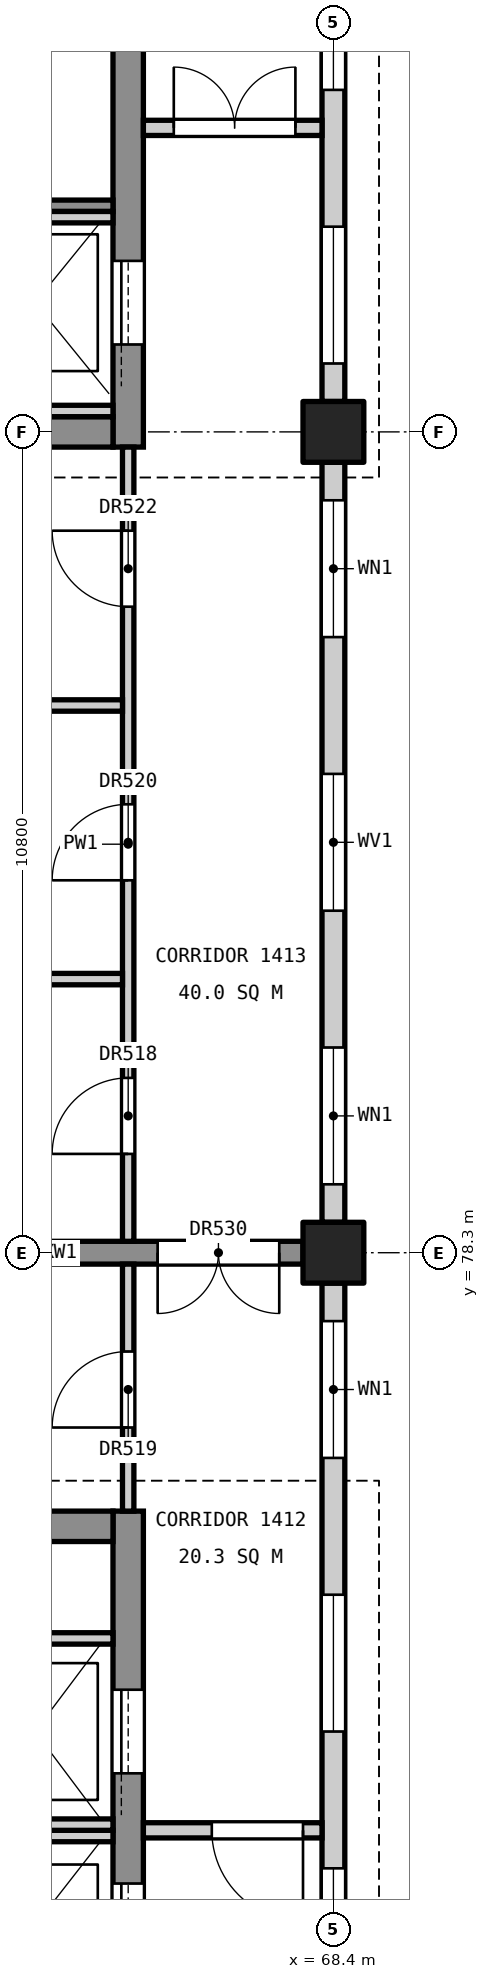
"""IFC4 building model, lengths in metres.
Left out: names, types, materials, properties, quantities, classifications, styles, units other than length and angle.
Written with IfcOpenShell. Run it as: python <this file> out.ifc"""

import sys

from ifc_helpers import new_model, si_unit, direction, frame, frame_2d, origin, origin_2d, place, context, subcontext, project, spatial, rectangle, extrude, element, fill, save


model = new_model("IFC4")
c1 = context("Model", 3, precision=1e-05, world=origin(), true_north=direction((0.0, 1.0)))
c2 = subcontext(c1, "Body", "Model", "MODEL_VIEW")
j1 = project(units=[si_unit("LENGTHUNIT", "METRE"), si_unit("PLANEANGLEUNIT", "RADIAN")], contexts=[c1])
p1 = place(None, origin())
s1 = spatial("IfcSite", under=j1, at=p1, CompositionType="ELEMENT")
p2 = place(p1, origin())
s2 = spatial("IfcBuilding", under=s1, at=p2, CompositionType="ELEMENT")
p3 = place(p2, frame((0.0, 0.0, 70.2)))
s3 = spatial("IfcBuildingStorey", under=s2, at=p3, CompositionType="ELEMENT", Elevation=70.2)
for number, where, z_axis, x_axis in (
    (1, (68.4, 78.3, 0.0), (0.0, 0.0, 1.0), (1.0, 0.0, 0.0)),
    (2, (68.4, 89.1, 0.0), (0.0, 0.0, 1.0), (1.0, 0.0, 0.0)),
):
    element("IfcColumn", number, at=place(p3, frame(where, z_axis=z_axis, x_axis=x_axis)), inside=s3, PredefinedType="COLUMN", context=c2, shape_type="SweptSolid", body=[
        extrude(rectangle(XDim=0.8, YDim=0.8, at=origin_2d()), origin(), (0.0, 0.0, 1.0), 4.8),
    ])
p4 = place(p3, frame((65.7, 60.1, 0.0), z_axis=(0.0, 0.0, 1.0), x_axis=(0.0, 1.0, 0.0)))
e3 = element("IfcWall", 3, at=p4, inside=s3, PredefinedType="SHEAR", context=c2, shape_type="SweptSolid", body=[
    extrude(rectangle(XDim=14.8, YDim=0.4, at=frame_2d((7.4, 0.0))), origin(), (0.0, 0.0, 1.0), 4.55),
])
p5 = place(p4, frame((0.5, 0.0, 0.0)))
e4 = element("IfcOpeningElement", 4, at=p5, cuts=e3, PredefinedType="OPENING", context=c2, shape_type="SweptSolid", body=[
    extrude(rectangle(XDim=1.4, YDim=2.1, at=frame_2d((0.7, 1.05))), frame((0.0, 0.21, 0.0), z_axis=(0.0, -1.0, 0.0), x_axis=(1.0, 0.0, 0.0)), (0.0, 0.0, 1.0), 0.42),
])
p6 = place(p4, frame((8.8, 0.0, 0.0)))
e5 = element("IfcOpeningElement", 5, at=p6, cuts=e3, PredefinedType="OPENING", context=c2, shape_type="SweptSolid", body=[
    extrude(rectangle(XDim=1.1, YDim=2.1, at=frame_2d((0.55, 1.05))), frame((0.0, 0.21, 0.0), z_axis=(0.0, -1.0, 0.0), x_axis=(1.0, 0.0, 0.0)), (0.0, 0.0, 1.0), 0.42),
])
p7 = place(p4, frame((11.35, 0.0, 0.0)))
e6 = element("IfcOpeningElement", 6, at=p7, cuts=e3, PredefinedType="OPENING", context=c2, shape_type="SweptSolid", body=[
    extrude(rectangle(XDim=1.1, YDim=2.1, at=frame_2d((0.55, 1.05))), frame((0.0, 0.21, 0.0), z_axis=(0.0, -1.0, 0.0), x_axis=(1.0, 0.0, 0.0)), (0.0, 0.0, 1.0), 0.42),
])
p8 = place(p3, frame((61.4, 74.7, 0.0), z_axis=(0.0, 0.0, 1.0), x_axis=(1.0, 0.0, 0.0)))
e7 = element("IfcWall", 7, at=p8, inside=s3, PredefinedType="SHEAR", context=c2, shape_type="SweptSolid", body=[
    extrude(rectangle(XDim=4.1, YDim=0.4, at=frame_2d((2.05, 0.0))), origin(), (0.0, 0.0, 1.0), 4.55),
])
p9 = place(p3, frame((65.7, 88.9, 0.0), z_axis=(0.0, 0.0, 1.0), x_axis=(0.0, 1.0, 0.0)))
e8 = element("IfcWall", 8, at=p9, inside=s3, PredefinedType="SHEAR", context=c2, shape_type="SweptSolid", body=[
    extrude(rectangle(XDim=11.2, YDim=0.4, at=frame_2d((5.6, 0.0))), origin(), (0.0, 0.0, 1.0), 4.55),
])
p10 = place(p9, frame((9.3, 0.0, 0.0)))
e9 = element("IfcOpeningElement", 9, at=p10, cuts=e8, PredefinedType="OPENING", context=c2, shape_type="SweptSolid", body=[
    extrude(rectangle(XDim=1.4, YDim=2.1, at=frame_2d((0.7, 1.05))), frame((0.0, 0.21, 0.0), z_axis=(0.0, -1.0, 0.0), x_axis=(1.0, 0.0, 0.0)), (0.0, 0.0, 1.0), 0.42),
])
p11 = place(p9, frame((1.35, 0.0, 0.0)))
e10 = element("IfcOpeningElement", 10, at=p11, cuts=e8, PredefinedType="OPENING", context=c2, shape_type="SweptSolid", body=[
    extrude(rectangle(XDim=1.1, YDim=2.1, at=frame_2d((0.55, 1.05))), frame((0.0, 0.21, 0.0), z_axis=(0.0, -1.0, 0.0), x_axis=(1.0, 0.0, 0.0)), (0.0, 0.0, 1.0), 0.42),
])
p12 = place(p3, frame((61.4, 89.1, 0.0), z_axis=(0.0, 0.0, 1.0), x_axis=(1.0, 0.0, 0.0)))
e11 = element("IfcWall", 11, at=p12, inside=s3, PredefinedType="SHEAR", context=c2, shape_type="SweptSolid", body=[
    extrude(rectangle(XDim=4.1, YDim=0.4, at=frame_2d((2.05, 0.0))), origin(), (0.0, 0.0, 1.0), 4.55),
])
p13 = place(p3, frame((61.6, 78.3, 0.0), z_axis=(0.0, 0.0, 1.0), x_axis=(1.0, 0.0, 0.0)))
e12 = element("IfcWall", 12, at=p13, inside=s3, PredefinedType="SHEAR", context=c2, shape_type="SweptSolid", body=[
    extrude(rectangle(XDim=6.4, YDim=0.3, at=frame_2d((3.2, 0.0))), origin(), (0.0, 0.0, 1.0), 4.55),
])
p14 = place(p13, frame((4.488, 0.0, 0.0)))
e13 = element("IfcOpeningElement", 13, at=p14, cuts=e12, PredefinedType="OPENING", context=c2, shape_type="SweptSolid", body=[
    extrude(rectangle(XDim=1.6, YDim=2.1, at=frame_2d((0.8, 1.05))), frame((0.0, 0.16, 0.0), z_axis=(0.0, -1.0, 0.0), x_axis=(1.0, 0.0, 0.0)), (0.0, 0.0, 1.0), 0.32),
])
p15 = place(p3, frame((61.4, 92.075, 0.0), z_axis=(0.0, 0.0, 1.0), x_axis=(1.0, 0.0, 0.0)))
e14 = element("IfcWall", 14, at=p15, inside=s3, PredefinedType="SOLIDWALL", context=c2, shape_type="SweptSolid", body=[
    extrude(rectangle(XDim=4.1, YDim=0.15, at=frame_2d((2.05, 0.0))), origin(), (0.0, 0.0, 1.0), 4.55),
])
p16 = place(p3, frame((63.65, 70.625, 0.0), z_axis=(0.0, 0.0, 1.0), x_axis=(1.0, 0.0, 0.0)))
e15 = element("IfcWall", 15, at=p16, inside=s3, PredefinedType="SOLIDWALL", context=c2, shape_type="SweptSolid", body=[
    extrude(rectangle(XDim=1.85, YDim=0.15, at=frame_2d((0.925, 0.0))), origin(), (0.0, 0.0, 1.0), 4.8),
])
for number, where, z_axis, x_axis in (
    (16, (63.65, 70.775, 0.0), (0.0, 0.0, 1.0), (1.0, 0.0, 0.0)),
    (17, (63.65, 73.225, 0.0), (0.0, 0.0, 1.0), (1.0, 0.0, 0.0)),
    (18, (63.65, 91.925, 0.0), (0.0, 0.0, 1.0), (1.0, 0.0, 0.0)),
    (19, (63.65, 89.375, 0.0), (0.0, 0.0, 1.0), (1.0, 0.0, 0.0)),
):
    element("IfcWall", number, at=place(p3, frame(where, z_axis=z_axis, x_axis=x_axis)), inside=s3, PredefinedType="SOLIDWALL", context=c2, shape_type="SweptSolid", body=[
        extrude(rectangle(XDim=1.85, YDim=0.15, at=frame_2d((0.925, 0.0))), origin(), (0.0, 0.0, 1.0), 4.55),
    ])
p17 = place(p3, frame((68.4, 67.9, 0.0), z_axis=(0.0, 0.0, 1.0), x_axis=(0.0, 1.0, 0.0)))
e20 = element("IfcWall", 20, at=p17, inside=s3, PredefinedType="STANDARD", context=c2, shape_type="SweptSolid", body=[
    extrude(rectangle(XDim=10.0, YDim=0.3, at=frame_2d((5.0, 0.0))), origin(), (0.0, 0.0, 1.0), 3.55),
])
p18 = place(p17, frame((0.5, 0.0, 0.9)))
e21 = element("IfcOpeningElement", 21, at=p18, cuts=e20, PredefinedType="OPENING", context=c2, shape_type="SweptSolid", body=[
    extrude(rectangle(XDim=1.8, YDim=2.4, at=frame_2d((0.9, 1.2))), frame((0.0, 0.16, 0.0), z_axis=(0.0, -1.0, 0.0), x_axis=(1.0, 0.0, 0.0)), (0.0, 0.0, 1.0), 0.32),
])
p19 = place(p17, frame((4.1, 0.0, 0.9)))
e22 = element("IfcOpeningElement", 22, at=p19, cuts=e20, PredefinedType="OPENING", context=c2, shape_type="SweptSolid", body=[
    extrude(rectangle(XDim=1.8, YDim=2.4, at=frame_2d((0.9, 1.2))), frame((0.0, 0.16, 0.0), z_axis=(0.0, -1.0, 0.0), x_axis=(1.0, 0.0, 0.0)), (0.0, 0.0, 1.0), 0.32),
])
p20 = place(p17, frame((7.7, 0.0, 0.9)))
e23 = element("IfcOpeningElement", 23, at=p20, cuts=e20, PredefinedType="OPENING", context=c2, shape_type="SweptSolid", body=[
    extrude(rectangle(XDim=1.8, YDim=2.4, at=frame_2d((0.9, 1.2))), frame((0.0, 0.16, 0.0), z_axis=(0.0, -1.0, 0.0), x_axis=(1.0, 0.0, 0.0)), (0.0, 0.0, 1.0), 0.32),
])
p21 = place(p3, frame((68.4, 78.7, 0.0), z_axis=(0.0, 0.0, 1.0), x_axis=(0.0, 1.0, 0.0)))
e24 = element("IfcWall", 24, at=p21, inside=s3, PredefinedType="STANDARD", context=c2, shape_type="SweptSolid", body=[
    extrude(rectangle(XDim=10.0, YDim=0.3, at=frame_2d((5.0, 0.0))), origin(), (0.0, 0.0, 1.0), 3.55),
])
p22 = place(p21, frame((0.5, 0.0, 0.9)))
e25 = element("IfcOpeningElement", 25, at=p22, cuts=e24, PredefinedType="OPENING", context=c2, shape_type="SweptSolid", body=[
    extrude(rectangle(XDim=1.8, YDim=2.4, at=frame_2d((0.9, 1.2))), frame((0.0, 0.16, 0.0), z_axis=(0.0, -1.0, 0.0), x_axis=(1.0, 0.0, 0.0)), (0.0, 0.0, 1.0), 0.32),
])
p23 = place(p21, frame((4.1, 0.0, 0.9)))
e26 = element("IfcOpeningElement", 26, at=p23, cuts=e24, PredefinedType="OPENING", context=c2, shape_type="SweptSolid", body=[
    extrude(rectangle(XDim=1.8, YDim=2.4, at=frame_2d((0.9, 1.2))), frame((0.0, 0.16, 0.0), z_axis=(0.0, -1.0, 0.0), x_axis=(1.0, 0.0, 0.0)), (0.0, 0.0, 1.0), 0.32),
])
p24 = place(p21, frame((7.7, 0.0, 0.9)))
e27 = element("IfcOpeningElement", 27, at=p24, cuts=e24, PredefinedType="OPENING", context=c2, shape_type="SweptSolid", body=[
    extrude(rectangle(XDim=1.8, YDim=2.4, at=frame_2d((0.9, 1.2))), frame((0.0, 0.16, 0.0), z_axis=(0.0, -1.0, 0.0), x_axis=(1.0, 0.0, 0.0)), (0.0, 0.0, 1.0), 0.32),
])
p25 = place(p3, frame((68.4, 89.5, 0.0), z_axis=(0.0, 0.0, 1.0), x_axis=(0.0, 1.0, 0.0)))
e28 = element("IfcWall", 28, at=p25, inside=s3, PredefinedType="STANDARD", context=c2, shape_type="SweptSolid", body=[
    extrude(rectangle(XDim=10.0, YDim=0.3, at=frame_2d((5.0, 0.0))), origin(), (0.0, 0.0, 1.0), 3.55),
])
p26 = place(p25, frame((0.5, 0.0, 0.9)))
e29 = element("IfcOpeningElement", 29, at=p26, cuts=e28, PredefinedType="OPENING", context=c2, shape_type="SweptSolid", body=[
    extrude(rectangle(XDim=1.8, YDim=2.4, at=frame_2d((0.9, 1.2))), frame((0.0, 0.16, 0.0), z_axis=(0.0, -1.0, 0.0), x_axis=(1.0, 0.0, 0.0)), (0.0, 0.0, 1.0), 0.32),
])
p27 = place(p25, frame((4.1, 0.0, 0.9)))
e30 = element("IfcOpeningElement", 30, at=p27, cuts=e28, PredefinedType="OPENING", context=c2, shape_type="SweptSolid", body=[
    extrude(rectangle(XDim=1.8, YDim=2.4, at=frame_2d((0.9, 1.2))), frame((0.0, 0.16, 0.0), z_axis=(0.0, -1.0, 0.0), x_axis=(1.0, 0.0, 0.0)), (0.0, 0.0, 1.0), 0.32),
])
p28 = place(p25, frame((7.7, 0.0, 0.9)))
e31 = element("IfcOpeningElement", 31, at=p28, cuts=e28, PredefinedType="OPENING", context=c2, shape_type="SweptSolid", body=[
    extrude(rectangle(XDim=1.8, YDim=2.4, at=frame_2d((0.9, 1.2))), frame((0.0, 0.16, 0.0), z_axis=(0.0, -1.0, 0.0), x_axis=(1.0, 0.0, 0.0)), (0.0, 0.0, 1.0), 0.32),
])
p29 = place(p3, frame((65.7, 74.9, 0.0), z_axis=(0.0, 0.0, 1.0), x_axis=(0.0, 1.0, 0.0)))
e32 = element("IfcWall", 32, at=p29, inside=s3, PredefinedType="PARTITIONING", context=c2, shape_type="SweptSolid", body=[
    extrude(rectangle(XDim=3.25, YDim=0.15, at=frame_2d((1.625, 0.0))), origin(), (0.0, 0.0, 1.0), 3.55),
])
p30 = place(p29, frame((1.1, 0.0, 0.0)))
e33 = element("IfcOpeningElement", 33, at=p30, cuts=e32, PredefinedType="OPENING", context=c2, shape_type="SweptSolid", body=[
    extrude(rectangle(XDim=1.0, YDim=2.1, at=frame_2d((0.5, 1.05))), frame((0.0, 0.085, 0.0), z_axis=(0.0, -1.0, 0.0), x_axis=(1.0, 0.0, 0.0)), (0.0, 0.0, 1.0), 0.17),
])
p31 = place(p3, frame((65.7, 78.45, 0.0), z_axis=(0.0, 0.0, 1.0), x_axis=(0.0, 1.0, 0.0)))
e34 = element("IfcWall", 34, at=p31, inside=s3, PredefinedType="PARTITIONING", context=c2, shape_type="SweptSolid", body=[
    extrude(rectangle(XDim=10.45, YDim=0.15, at=frame_2d((5.225, 0.0))), origin(), (0.0, 0.0, 1.0), 3.55),
])
p32 = place(p31, frame((1.15, 0.0, 0.0)))
e35 = element("IfcOpeningElement", 35, at=p32, cuts=e34, PredefinedType="OPENING", context=c2, shape_type="SweptSolid", body=[
    extrude(rectangle(XDim=1.0, YDim=2.1, at=frame_2d((0.5, 1.05))), frame((0.0, 0.085, 0.0), z_axis=(0.0, -1.0, 0.0), x_axis=(1.0, 0.0, 0.0)), (0.0, 0.0, 1.0), 0.17),
])
p33 = place(p31, frame((4.75, 0.0, 0.0)))
e36 = element("IfcOpeningElement", 36, at=p33, cuts=e34, PredefinedType="OPENING", context=c2, shape_type="SweptSolid", body=[
    extrude(rectangle(XDim=1.0, YDim=2.1, at=frame_2d((0.5, 1.05))), frame((0.0, 0.085, 0.0), z_axis=(0.0, -1.0, 0.0), x_axis=(1.0, 0.0, 0.0)), (0.0, 0.0, 1.0), 0.17),
])
p34 = place(p31, frame((8.35, 0.0, 0.0)))
e37 = element("IfcOpeningElement", 37, at=p34, cuts=e34, PredefinedType="OPENING", context=c2, shape_type="SweptSolid", body=[
    extrude(rectangle(XDim=1.0, YDim=2.1, at=frame_2d((0.5, 1.05))), frame((0.0, 0.085, 0.0), z_axis=(0.0, -1.0, 0.0), x_axis=(1.0, 0.0, 0.0)), (0.0, 0.0, 1.0), 0.17),
])
for number, where, z_axis, x_axis in (
    (38, (61.35, 81.9, 0.0), (0.0, 0.0, 1.0), (1.0, 0.0, 0.0)),
    (39, (61.35, 85.5, 0.0), (0.0, 0.0, 1.0), (1.0, 0.0, 0.0)),
):
    element("IfcWall", number, at=place(p3, frame(where, z_axis=z_axis, x_axis=x_axis)), inside=s3, PredefinedType="PARTITIONING", context=c2, shape_type="SweptSolid", body=[
        extrude(rectangle(XDim=4.275, YDim=0.15, at=frame_2d((2.137, 0.0))), origin(), (0.0, 0.0, 1.0), 3.85),
    ])
p35 = place(p3, frame((65.9, 93.1, 0.0), z_axis=(0.0, 0.0, 1.0), x_axis=(1.0, 0.0, 0.0)))
e40 = element("IfcWall", 40, at=p35, inside=s3, PredefinedType="PARTITIONING", context=c2, shape_type="SweptSolid", body=[
    extrude(rectangle(XDim=2.35, YDim=0.2, at=frame_2d((1.175, 0.0))), origin(), (0.0, 0.0, 1.0), 3.55),
])
p36 = place(p35, frame((0.4, 0.0, 0.0)))
e41 = element("IfcOpeningElement", 41, at=p36, cuts=e40, PredefinedType="OPENING", context=c2, shape_type="SweptSolid", body=[
    extrude(rectangle(XDim=1.6, YDim=2.1, at=frame_2d((0.8, 1.05))), frame((0.0, 0.11, 0.0), z_axis=(0.0, -1.0, 0.0), x_axis=(1.0, 0.0, 0.0)), (0.0, 0.0, 1.0), 0.22),
])
p37 = place(p3, frame((65.9, 70.7, 0.0), z_axis=(0.0, 0.0, 1.0), x_axis=(1.0, 0.0, 0.0)))
e42 = element("IfcWall", 42, at=p37, inside=s3, PredefinedType="PARTITIONING", context=c2, shape_type="SweptSolid", body=[
    extrude(rectangle(XDim=2.35, YDim=0.2, at=frame_2d((1.175, 0.0))), origin(), (0.0, 0.0, 1.0), 3.55),
])
p38 = place(p37, frame((0.9, 0.0, 0.0)))
e43 = element("IfcOpeningElement", 43, at=p38, cuts=e42, PredefinedType="OPENING", context=c2, shape_type="SweptSolid", body=[
    extrude(rectangle(XDim=1.2, YDim=2.1, at=frame_2d((0.6, 1.05))), frame((0.0, 0.11, 0.0), z_axis=(0.0, -1.0, 0.0), x_axis=(1.0, 0.0, 0.0)), (0.0, 0.0, 1.0), 0.22),
])
p39 = place(p6, origin())
e44 = element("IfcDoor", 44, at=p39, inside=s3, OperationType="SLIDING_TO_LEFT", PredefinedType="DOOR", context=c2, shape_type="SweptSolid", body=[
    extrude(rectangle(XDim=1.1, YDim=2.1, at=frame_2d((0.55, 1.05))), frame((0.0, 0.025, 0.0), z_axis=(0.0, -1.0, 0.0), x_axis=(1.0, 0.0, 0.0)), (0.0, 0.0, 1.0), 0.05),
])
fill(e5, e44)
p40 = place(p7, origin())
e45 = element("IfcDoor", 45, at=p40, inside=s3, OperationType="SLIDING_TO_LEFT", PredefinedType="DOOR", context=c2, shape_type="SweptSolid", body=[
    extrude(rectangle(XDim=1.1, YDim=2.1, at=frame_2d((0.55, 1.05))), frame((0.0, 0.025, 0.0), z_axis=(0.0, -1.0, 0.0), x_axis=(1.0, 0.0, 0.0)), (0.0, 0.0, 1.0), 0.05),
])
fill(e6, e45)
p41 = place(p11, origin())
e46 = element("IfcDoor", 46, at=p41, inside=s3, OperationType="SLIDING_TO_LEFT", PredefinedType="DOOR", context=c2, shape_type="SweptSolid", body=[
    extrude(rectangle(XDim=1.1, YDim=2.1, at=frame_2d((0.55, 1.05))), frame((0.0, 0.025, 0.0), z_axis=(0.0, -1.0, 0.0), x_axis=(1.0, 0.0, 0.0)), (0.0, 0.0, 1.0), 0.05),
])
fill(e10, e46)
p42 = place(p18, origin())
e47 = element("IfcWindow", 47, at=p42, inside=s3, PartitioningType="SINGLE_PANEL", PredefinedType="WINDOW", context=c2, shape_type="SweptSolid", body=[
    extrude(rectangle(XDim=1.8, YDim=2.4, at=frame_2d((0.9, 1.2))), frame((0.0, 0.03, 0.0), z_axis=(0.0, -1.0, 0.0), x_axis=(1.0, 0.0, 0.0)), (0.0, 0.0, 1.0), 0.06),
])
fill(e21, e47)
p43 = place(p19, origin())
e48 = element("IfcWindow", 48, at=p43, inside=s3, PartitioningType="SINGLE_PANEL", PredefinedType="WINDOW", context=c2, shape_type="SweptSolid", body=[
    extrude(rectangle(XDim=1.8, YDim=2.4, at=frame_2d((0.9, 1.2))), frame((0.0, 0.03, 0.0), z_axis=(0.0, -1.0, 0.0), x_axis=(1.0, 0.0, 0.0)), (0.0, 0.0, 1.0), 0.06),
])
fill(e22, e48)
p44 = place(p20, origin())
e49 = element("IfcWindow", 49, at=p44, inside=s3, PartitioningType="SINGLE_PANEL", PredefinedType="WINDOW", context=c2, shape_type="SweptSolid", body=[
    extrude(rectangle(XDim=1.8, YDim=2.4, at=frame_2d((0.9, 1.2))), frame((0.0, 0.03, 0.0), z_axis=(0.0, -1.0, 0.0), x_axis=(1.0, 0.0, 0.0)), (0.0, 0.0, 1.0), 0.06),
])
fill(e23, e49)
p45 = place(p22, origin())
e50 = element("IfcWindow", 50, at=p45, inside=s3, PartitioningType="SINGLE_PANEL", PredefinedType="WINDOW", context=c2, shape_type="SweptSolid", body=[
    extrude(rectangle(XDim=1.8, YDim=2.4, at=frame_2d((0.9, 1.2))), frame((0.0, 0.03, 0.0), z_axis=(0.0, -1.0, 0.0), x_axis=(1.0, 0.0, 0.0)), (0.0, 0.0, 1.0), 0.06),
])
fill(e25, e50)
p46 = place(p23, origin())
e51 = element("IfcWindow", 51, at=p46, inside=s3, PartitioningType="SINGLE_PANEL", PredefinedType="WINDOW", context=c2, shape_type="SweptSolid", body=[
    extrude(rectangle(XDim=1.8, YDim=2.4, at=frame_2d((0.9, 1.2))), frame((0.0, 0.03, 0.0), z_axis=(0.0, -1.0, 0.0), x_axis=(1.0, 0.0, 0.0)), (0.0, 0.0, 1.0), 0.06),
])
fill(e26, e51)
p47 = place(p24, origin())
e52 = element("IfcWindow", 52, at=p47, inside=s3, PartitioningType="SINGLE_PANEL", PredefinedType="WINDOW", context=c2, shape_type="SweptSolid", body=[
    extrude(rectangle(XDim=1.8, YDim=2.4, at=frame_2d((0.9, 1.2))), frame((0.0, 0.03, 0.0), z_axis=(0.0, -1.0, 0.0), x_axis=(1.0, 0.0, 0.0)), (0.0, 0.0, 1.0), 0.06),
])
fill(e27, e52)
p48 = place(p26, origin())
e53 = element("IfcWindow", 53, at=p48, inside=s3, PartitioningType="SINGLE_PANEL", PredefinedType="WINDOW", context=c2, shape_type="SweptSolid", body=[
    extrude(rectangle(XDim=1.8, YDim=2.4, at=frame_2d((0.9, 1.2))), frame((0.0, 0.03, 0.0), z_axis=(0.0, -1.0, 0.0), x_axis=(1.0, 0.0, 0.0)), (0.0, 0.0, 1.0), 0.06),
])
fill(e29, e53)
p49 = place(p27, origin())
e54 = element("IfcWindow", 54, at=p49, inside=s3, PartitioningType="SINGLE_PANEL", PredefinedType="WINDOW", context=c2, shape_type="SweptSolid", body=[
    extrude(rectangle(XDim=1.8, YDim=2.4, at=frame_2d((0.9, 1.2))), frame((0.0, 0.03, 0.0), z_axis=(0.0, -1.0, 0.0), x_axis=(1.0, 0.0, 0.0)), (0.0, 0.0, 1.0), 0.06),
])
fill(e30, e54)
p50 = place(p32, origin())
e55 = element("IfcDoor", 55, at=p50, inside=s3, OperationType="SINGLE_SWING_LEFT", PredefinedType="DOOR", context=c2, shape_type="SweptSolid", body=[
    extrude(rectangle(XDim=1.0, YDim=2.1, at=frame_2d((0.5, 1.05))), frame((0.0, 0.025, 0.0), z_axis=(0.0, -1.0, 0.0), x_axis=(1.0, 0.0, 0.0)), (0.0, 0.0, 1.0), 0.05),
])
fill(e35, e55)
p51 = place(p30, origin())
e56 = element("IfcDoor", 56, at=p51, inside=s3, OperationType="SINGLE_SWING_LEFT", PredefinedType="DOOR", context=c2, shape_type="SweptSolid", body=[
    extrude(rectangle(XDim=1.0, YDim=2.1, at=frame_2d((0.5, 1.05))), frame((0.0, 0.025, 0.0), z_axis=(0.0, -1.0, 0.0), x_axis=(1.0, 0.0, 0.0)), (0.0, 0.0, 1.0), 0.05),
])
fill(e33, e56)
p52 = place(p33, origin())
e57 = element("IfcDoor", 57, at=p52, inside=s3, OperationType="SINGLE_SWING_LEFT", PredefinedType="DOOR", context=c2, shape_type="SweptSolid", body=[
    extrude(rectangle(XDim=1.0, YDim=2.1, at=frame_2d((0.5, 1.05))), frame((0.0, 0.025, 0.0), z_axis=(0.0, -1.0, 0.0), x_axis=(1.0, 0.0, 0.0)), (0.0, 0.0, 1.0), 0.05),
])
fill(e36, e57)
p53 = place(p34, origin())
e58 = element("IfcDoor", 58, at=p53, inside=s3, OperationType="SINGLE_SWING_RIGHT", PredefinedType="DOOR", context=c2, shape_type="SweptSolid", body=[
    extrude(rectangle(XDim=1.0, YDim=2.1, at=frame_2d((0.5, 1.05))), frame((0.0, 0.025, 0.0), z_axis=(0.0, -1.0, 0.0), x_axis=(1.0, 0.0, 0.0)), (0.0, 0.0, 1.0), 0.05),
])
fill(e37, e58)
p54 = place(p38, frame((1.2, 0.0, 0.0), z_axis=(0.0, 0.0, 1.0), x_axis=(-1.0, 0.0, 0.0)))
e59 = element("IfcDoor", 59, at=p54, inside=s3, OperationType="SINGLE_SWING_LEFT", PredefinedType="DOOR", context=c2, shape_type="SweptSolid", body=[
    extrude(rectangle(XDim=1.2, YDim=2.1, at=frame_2d((0.6, 1.05))), frame((0.0, 0.025, 0.0), z_axis=(0.0, -1.0, 0.0), x_axis=(1.0, 0.0, 0.0)), (0.0, 0.0, 1.0), 0.05),
])
fill(e43, e59)
p55 = place(p36, origin())
e60 = element("IfcDoor", 60, at=p55, inside=s3, OperationType="DOUBLE_DOOR_SINGLE_SWING", PredefinedType="DOOR", context=c2, shape_type="SweptSolid", body=[
    extrude(rectangle(XDim=1.6, YDim=2.1, at=frame_2d((0.8, 1.05))), frame((0.0, 0.025, 0.0), z_axis=(0.0, -1.0, 0.0), x_axis=(1.0, 0.0, 0.0)), (0.0, 0.0, 1.0), 0.05),
])
fill(e41, e60)
p56 = place(p14, frame((1.6, 0.0, 0.0), z_axis=(0.0, 0.0, 1.0), x_axis=(-1.0, 0.0, 0.0)))
e61 = element("IfcDoor", 61, at=p56, inside=s3, OperationType="DOUBLE_DOOR_SINGLE_SWING", PredefinedType="DOOR", context=c2, shape_type="SweptSolid", body=[
    extrude(rectangle(XDim=1.6, YDim=2.1, at=frame_2d((0.8, 1.05))), frame((0.0, 0.025, 0.0), z_axis=(0.0, -1.0, 0.0), x_axis=(1.0, 0.0, 0.0)), (0.0, 0.0, 1.0), 0.05),
])
fill(e13, e61)
save(model, sys.argv[1])
